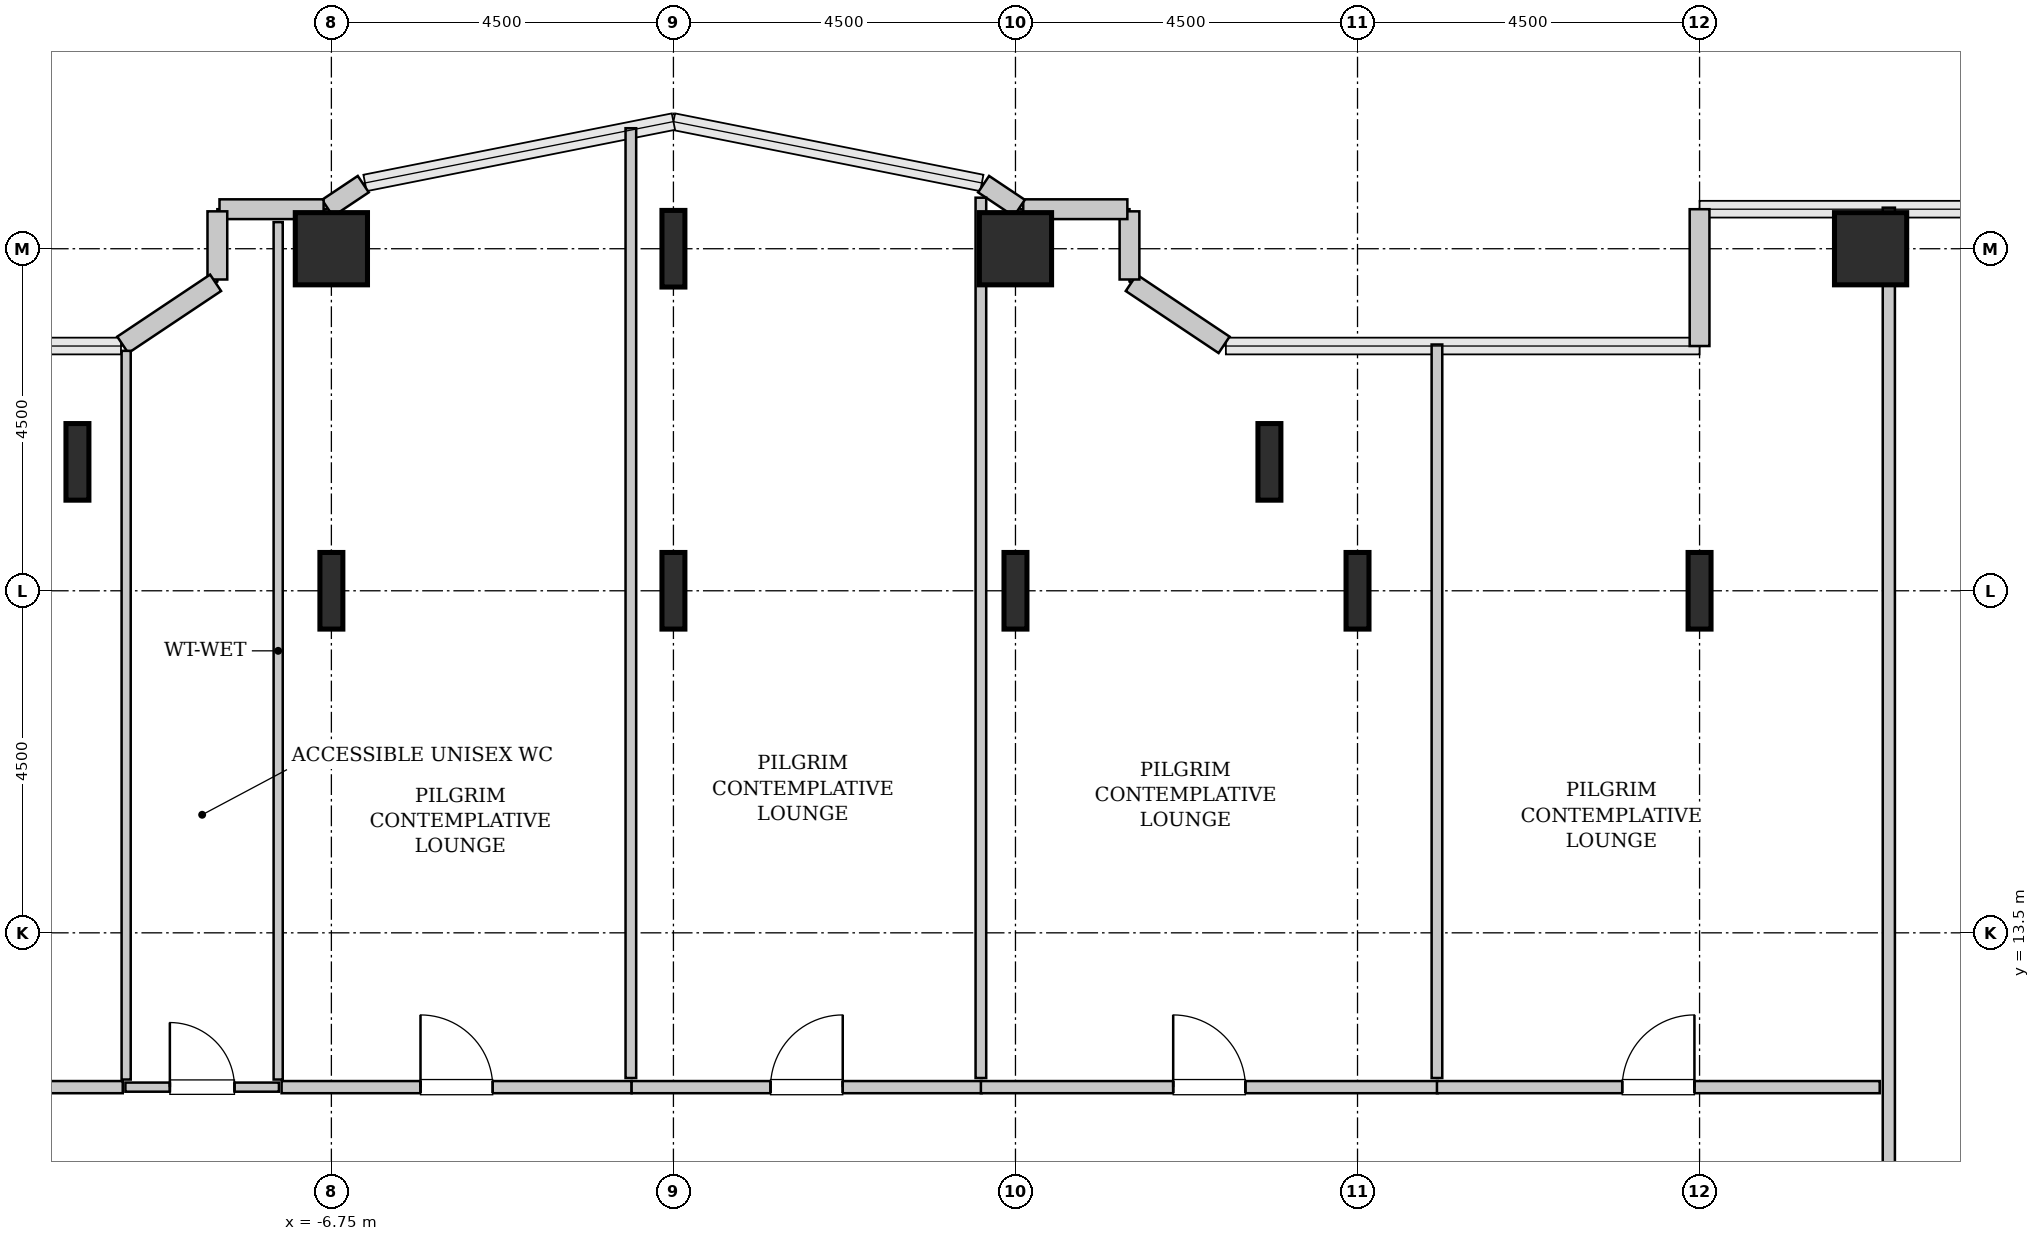
"""IFC4 building model, lengths in metres.
Left out: names, types, materials, properties, quantities, classifications, styles, units other than length and angle.
Written with IfcOpenShell. Run it as: python <this file> out.ifc"""

import sys

from ifc_helpers import new_model, si_unit, direction, frame, frame_2d, origin, origin_2d, place, context, subcontext, project, spatial, rectangle, hollow_rectangle, i_section, extrude, source, transform, mapped, element, fill, save


model = new_model("IFC4")
c1 = context("Model", 3, precision=1e-05, world=origin(), true_north=direction((0.0, 1.0)))
c2 = subcontext(c1, "Body", "Model", "MODEL_VIEW")
j1 = project(units=[si_unit("LENGTHUNIT", "METRE"), si_unit("PLANEANGLEUNIT", "RADIAN")], contexts=[c1])
p1 = place(None, origin())
s1 = spatial("IfcSite", under=j1, at=p1, CompositionType="ELEMENT")
p2 = place(p1, origin())
s2 = spatial("IfcBuilding", under=s1, at=p2, CompositionType="ELEMENT")
p3 = place(p2, frame((0.0, 0.0, 63.4)))
s3 = spatial("IfcBuildingStorey", under=s2, at=p3, CompositionType="ELEMENT", Elevation=63.4)
m1 = source(origin(), c2, "Body", "SweptSolid", [
    extrude(i_section(OverallWidth=0.302, OverallDepth=1.008, WebThickness=0.021, FlangeThickness=0.04, FilletRadius=0.03, at=origin_2d()), origin(), (0.0, 0.0, 1.0), 3.8),
])
for number, where, z_axis, x_axis in (
    (1, (-10.091, 19.696, 0.0), (0.0, 0.0, 1.0), (1.0, 0.0, 0.0)),
    (2, (-6.75, 18.0, 0.0), (0.0, 0.0, 1.0), (1.0, 0.0, 0.0)),
):
    element("IfcColumn", number, at=place(p3, frame(where, z_axis=z_axis, x_axis=x_axis)), inside=s3, PredefinedType="COLUMN", context=c2, shape_type="MappedRepresentation", body=[
        mapped(m1, transform((0.0, 0.0, 0.0), x_axis=(1.0, 0.0, 0.0), y_axis=(0.0, 1.0, 0.0), z_axis=(0.0, 0.0, 1.0), scale=1.0)),
    ])
m2 = source(origin(), c2, "Body", "SweptSolid", [
    extrude(hollow_rectangle(XDim=0.95, YDim=0.95, WallThickness=0.045, InnerFilletRadius=0.045, OuterFilletRadius=0.09, at=origin_2d()), origin(), (0.0, 0.0, 1.0), 3.8),
])
p4 = place(p3, frame((-6.75, 22.5, 0.0), z_axis=(0.0, 0.0, 1.0), x_axis=(1.0, 0.0, 0.0)))
e3 = element("IfcColumn", 3, at=p4, inside=s3, PredefinedType="COLUMN", context=c2, shape_type="MappedRepresentation", body=[
    mapped(m2, transform((0.0, 0.0, 0.0), x_axis=(1.0, 0.0, 0.0), y_axis=(0.0, 1.0, 0.0), z_axis=(0.0, 0.0, 1.0), scale=1.0)),
])
for number, where, z_axis, x_axis in (
    (4, (-2.25, 18.0, 0.0), (0.0, 0.0, 1.0), (1.0, 0.0, 0.0)),
    (5, (-2.25, 22.5, 0.0), (0.0, 0.0, 1.0), (1.0, 0.0, 0.0)),
    (6, (2.25, 18.0, 0.0), (0.0, 0.0, 1.0), (1.0, 0.0, 0.0)),
):
    element("IfcColumn", number, at=place(p3, frame(where, z_axis=z_axis, x_axis=x_axis)), inside=s3, PredefinedType="COLUMN", context=c2, shape_type="MappedRepresentation", body=[
        mapped(m1, transform((0.0, 0.0, 0.0), x_axis=(1.0, 0.0, 0.0), y_axis=(0.0, 1.0, 0.0), z_axis=(0.0, 0.0, 1.0), scale=1.0)),
    ])
p5 = place(p3, frame((2.25, 22.5, 0.0), z_axis=(0.0, 0.0, 1.0), x_axis=(1.0, 0.0, 0.0)))
e7 = element("IfcColumn", 7, at=p5, inside=s3, PredefinedType="COLUMN", context=c2, shape_type="MappedRepresentation", body=[
    mapped(m2, transform((0.0, 0.0, 0.0), x_axis=(1.0, 0.0, 0.0), y_axis=(0.0, 1.0, 0.0), z_axis=(0.0, 0.0, 1.0), scale=1.0)),
])
for number, where, z_axis, x_axis in (
    (8, (5.591, 19.696, 0.0), (0.0, 0.0, 1.0), (1.0, 0.0, 0.0)),
    (9, (6.75, 18.0, 0.0), (0.0, 0.0, 1.0), (1.0, 0.0, 0.0)),
    (10, (11.25, 18.0, 0.0), (0.0, 0.0, 1.0), (1.0, 0.0, 0.0)),
):
    element("IfcColumn", number, at=place(p3, frame(where, z_axis=z_axis, x_axis=x_axis)), inside=s3, PredefinedType="COLUMN", context=c2, shape_type="MappedRepresentation", body=[
        mapped(m1, transform((0.0, 0.0, 0.0), x_axis=(1.0, 0.0, 0.0), y_axis=(0.0, 1.0, 0.0), z_axis=(0.0, 0.0, 1.0), scale=1.0)),
    ])
p6 = place(p3, frame((13.5, 22.5, 0.0), z_axis=(0.0, 0.0, 1.0), x_axis=(1.0, 0.0, 0.0)))
e11 = element("IfcColumn", 11, at=p6, inside=s3, PredefinedType="COLUMN", context=c2, shape_type="MappedRepresentation", body=[
    mapped(m2, transform((0.0, 0.0, 0.0), x_axis=(1.0, 0.0, 0.0), y_axis=(0.0, 1.0, 0.0), z_axis=(0.0, 0.0, 1.0), scale=1.0)),
])
m3 = source(origin(), c2, "Body", "SweptSolid", [
    extrude(rectangle(XDim=1.8, YDim=0.26, at=frame_2d((0.9, 0.0))), origin(), (0.0, 0.0, 1.0), 3.55),
])
p7 = place(p3, frame((11.25, 23.02, 0.0), z_axis=(0.0, 0.0, 1.0), x_axis=(0.0, -1.0, 0.0)))
e12 = element("IfcWall", 12, at=p7, inside=s3, PredefinedType="SOLIDWALL", context=c2, shape_type="MappedRepresentation", body=[
    mapped(m3, transform((0.0, 0.0, 0.0), x_axis=(1.0, 0.0, 0.0), y_axis=(0.0, 1.0, 0.0), z_axis=(0.0, 0.0, 1.0), scale=1.0)),
])
m4 = source(origin(), c2, "Body", "SweptSolid", [
    extrude(rectangle(XDim=1.469, YDim=0.26, at=frame_2d((0.734, 0.0))), origin(), (0.0, 0.0, 1.0), 3.55),
])
p8 = place(p3, frame((4.995, 21.236, 0.0), z_axis=(0.0, 0.0, 1.0), x_axis=(-0.831461760506, 0.555581983884, 0.0)))
e13 = element("IfcWall", 13, at=p8, inside=s3, PredefinedType="SOLIDWALL", context=c2, shape_type="MappedRepresentation", body=[
    mapped(m4, transform((0.0, 0.0, 0.0), x_axis=(1.0, 0.0, 0.0), y_axis=(0.0, 1.0, 0.0), z_axis=(0.0, 0.0, 1.0), scale=1.0)),
])
m5 = source(origin(), c2, "Body", "SweptSolid", [
    extrude(rectangle(XDim=0.897, YDim=0.26, at=frame_2d((0.448, 0.0))), origin(), (0.0, 0.0, 1.0), 3.55),
])
p9 = place(p3, frame((3.75, 22.095, 0.0), z_axis=(0.0, 0.0, 1.0), x_axis=(0.0, 1.0, 0.0)))
e14 = element("IfcWall", 14, at=p9, inside=s3, PredefinedType="SOLIDWALL", context=c2, shape_type="MappedRepresentation", body=[
    mapped(m5, transform((0.0, 0.0, 0.0), x_axis=(1.0, 0.0, 0.0), y_axis=(0.0, 1.0, 0.0), z_axis=(0.0, 0.0, 1.0), scale=1.0)),
])
m6 = source(origin(), c2, "Body", "SweptSolid", [
    extrude(rectangle(XDim=1.37, YDim=0.26, at=frame_2d((0.685, 0.0))), origin(), (0.0, 0.0, 1.0), 3.55),
])
p10 = place(p3, frame((3.722, 23.02, 0.0), z_axis=(0.0, 0.0, 1.0), x_axis=(-1.0, 0.0, 0.0)))
e15 = element("IfcWall", 15, at=p10, inside=s3, PredefinedType="SOLIDWALL", context=c2, shape_type="MappedRepresentation", body=[
    mapped(m6, transform((0.0, 0.0, 0.0), x_axis=(1.0, 0.0, 0.0), y_axis=(0.0, 1.0, 0.0), z_axis=(0.0, 0.0, 1.0), scale=1.0)),
])
m7 = source(origin(), c2, "Body", "SweptSolid", [
    extrude(rectangle(XDim=0.565, YDim=0.26, at=frame_2d((0.283, 0.0))), origin(), (0.0, 0.0, 1.0), 3.55),
])
for number, where, z_axis, x_axis in (
    (16, (2.301, 23.036, 0.0), (0.0, 0.0, 1.0), (-0.832, 0.555, 0.0)),
    (17, (-6.331, 23.35, 0.0), (0.0, 0.0, 1.0), (-0.832, -0.555, 0.0)),
):
    element("IfcWall", number, at=place(p3, frame(where, z_axis=z_axis, x_axis=x_axis)), inside=s3, PredefinedType="SOLIDWALL", context=c2, shape_type="MappedRepresentation", body=[
        mapped(m7, transform((0.0, 0.0, 0.0), x_axis=(1.0, 0.0, 0.0), y_axis=(0.0, 1.0, 0.0), z_axis=(0.0, 0.0, 1.0), scale=1.0)),
    ])
p11 = place(p3, frame((-6.852, 23.02, 0.0), z_axis=(0.0, 0.0, 1.0), x_axis=(-1.0, 0.0, 0.0)))
e18 = element("IfcWall", 18, at=p11, inside=s3, PredefinedType="SOLIDWALL", context=c2, shape_type="MappedRepresentation", body=[
    mapped(m6, transform((0.0, 0.0, 0.0), x_axis=(1.0, 0.0, 0.0), y_axis=(0.0, 1.0, 0.0), z_axis=(0.0, 0.0, 1.0), scale=1.0)),
])
p12 = place(p3, frame((-8.25, 22.992, 0.0), z_axis=(0.0, 0.0, 1.0), x_axis=(0.0, -1.0, 0.0)))
e19 = element("IfcWall", 19, at=p12, inside=s3, PredefinedType="SOLIDWALL", context=c2, shape_type="MappedRepresentation", body=[
    mapped(m5, transform((0.0, 0.0, 0.0), x_axis=(1.0, 0.0, 0.0), y_axis=(0.0, 1.0, 0.0), z_axis=(0.0, 0.0, 1.0), scale=1.0)),
])
p13 = place(p3, frame((-8.273, 22.052, 0.0), z_axis=(0.0, 0.0, 1.0), x_axis=(-0.831461760506, -0.555581983884, 0.0)))
e20 = element("IfcWall", 20, at=p13, inside=s3, PredefinedType="SOLIDWALL", context=c2, shape_type="MappedRepresentation", body=[
    mapped(m4, transform((0.0, 0.0, 0.0), x_axis=(1.0, 0.0, 0.0), y_axis=(0.0, 1.0, 0.0), z_axis=(0.0, 0.0, 1.0), scale=1.0)),
])
m8 = source(origin(), c2, "Body", "SweptSolid", [
    extrude(rectangle(XDim=2.02, YDim=0.12, at=frame_2d((1.01, 0.0))), origin(), (0.0, 0.0, 1.0), 3.535),
])
p14 = place(p3, frame((-9.46, 11.47, 0.0), z_axis=(0.0, 0.0, 1.0), x_axis=(1.0, 0.0, 0.0)))
e21 = element("IfcWall", 21, at=p14, inside=s3, PredefinedType="PLUMBINGWALL", context=c2, shape_type="MappedRepresentation", body=[
    mapped(m8, transform((0.0, 0.0, 0.0), x_axis=(1.0, 0.0, 0.0), y_axis=(0.0, 1.0, 0.0), z_axis=(0.0, 0.0, 1.0), scale=1.0)),
])
p15 = place(p14, frame((0.585, 0.0, 0.0)))
e22 = element("IfcOpeningElement", 22, at=p15, cuts=e21, PredefinedType="OPENING", context=c2, shape_type="SweptSolid", body=[
    extrude(rectangle(XDim=0.85, YDim=2.1, at=frame_2d((0.425, 1.05))), frame((0.0, 0.07, 0.0), z_axis=(0.0, -1.0, 0.0), x_axis=(1.0, 0.0, 0.0)), (0.0, 0.0, 1.0), 0.14),
])
m9 = source(origin(), c2, "Body", "SweptSolid", [
    extrude(rectangle(XDim=11.28, YDim=0.12, at=frame_2d((5.64, 0.0))), origin(), (0.0, 0.0, 1.0), 3.535),
])
p16 = place(p3, frame((-7.45, 11.57, 0.0), z_axis=(0.0, 0.0, 1.0), x_axis=(0.0, 1.0, 0.0)))
e23 = element("IfcWall", 23, at=p16, inside=s3, PredefinedType="PLUMBINGWALL", context=c2, shape_type="MappedRepresentation", body=[
    mapped(m9, transform((0.0, 0.0, 0.0), x_axis=(1.0, 0.0, 0.0), y_axis=(0.0, 1.0, 0.0), z_axis=(0.0, 0.0, 1.0), scale=1.0)),
])
m10 = source(origin(), c2, "Body", "SweptSolid", [
    extrude(rectangle(XDim=9.587, YDim=0.12, at=frame_2d((4.793, 0.0))), origin(), (0.0, 0.0, 1.0), 3.535),
])
p17 = place(p3, frame((-9.45, 11.57, 0.0), z_axis=(0.0, 0.0, 1.0), x_axis=(0.0, 1.0, 0.0)))
e24 = element("IfcWall", 24, at=p17, inside=s3, PredefinedType="PLUMBINGWALL", context=c2, shape_type="MappedRepresentation", body=[
    mapped(m10, transform((0.0, 0.0, 0.0), x_axis=(1.0, 0.0, 0.0), y_axis=(0.0, 1.0, 0.0), z_axis=(0.0, 0.0, 1.0), scale=1.0)),
])
m11 = source(origin(), c2, "Body", "SweptSolid", [
    extrude(rectangle(XDim=14.545, YDim=0.16, at=frame_2d((7.272, 0.0))), origin(), (0.0, 0.0, 1.0), 3.535),
])
p18 = place(p3, frame((13.74, 8.495, 0.0), z_axis=(0.0, 0.0, 1.0), x_axis=(0.0, 1.0, 0.0)))
e25 = element("IfcWall", 25, at=p18, inside=s3, PredefinedType="PARTITIONING", context=c2, shape_type="MappedRepresentation", body=[
    mapped(m11, transform((0.0, 0.0, 0.0), x_axis=(1.0, 0.0, 0.0), y_axis=(0.0, 1.0, 0.0), z_axis=(0.0, 0.0, 1.0), scale=1.0)),
])
p19 = place(p18, frame((1.032, 0.0, 0.0)))
e26 = element("IfcOpeningElement", 26, at=p19, cuts=e25, PredefinedType="OPENING", context=c2, shape_type="SweptSolid", body=[
    extrude(rectangle(XDim=0.95, YDim=2.1, at=frame_2d((0.475, 1.05))), frame((0.0, 0.09, 0.0), z_axis=(0.0, -1.0, 0.0), x_axis=(1.0, 0.0, 0.0)), (0.0, 0.0, 1.0), 0.18),
])
m12 = source(origin(), c2, "Body", "SweptSolid", [
    extrude(rectangle(XDim=4.125, YDim=0.16, at=frame_2d((2.062, 0.0))), origin(), (0.0, 0.0, 1.0), 3.535),
])
p20 = place(p3, frame((-13.62, 11.47, 0.0), z_axis=(0.0, 0.0, 1.0), x_axis=(1.0, 0.0, 0.0)))
e27 = element("IfcWall", 27, at=p20, inside=s3, PredefinedType="PARTITIONING", context=c2, shape_type="MappedRepresentation", body=[
    mapped(m12, transform((0.0, 0.0, 0.0), x_axis=(1.0, 0.0, 0.0), y_axis=(0.0, 1.0, 0.0), z_axis=(0.0, 0.0, 1.0), scale=1.0)),
])
p21 = place(p20, frame((1.587, 0.0, 0.0)))
e28 = element("IfcOpeningElement", 28, at=p21, cuts=e27, PredefinedType="OPENING", context=c2, shape_type="SweptSolid", body=[
    extrude(rectangle(XDim=0.95, YDim=2.1, at=frame_2d((0.475, 1.05))), frame((0.0, 0.09, 0.0), z_axis=(0.0, -1.0, 0.0), x_axis=(1.0, 0.0, 0.0)), (0.0, 0.0, 1.0), 0.18),
])
m13 = source(origin(), c2, "Body", "SweptSolid", [
    extrude(rectangle(XDim=4.605, YDim=0.16, at=frame_2d((2.302, 0.0))), origin(), (0.0, 0.0, 1.0), 3.535),
])
p22 = place(p3, frame((-7.405, 11.47, 0.0), z_axis=(0.0, 0.0, 1.0), x_axis=(1.0, 0.0, 0.0)))
e29 = element("IfcWall", 29, at=p22, inside=s3, PredefinedType="PARTITIONING", context=c2, shape_type="MappedRepresentation", body=[
    mapped(m13, transform((0.0, 0.0, 0.0), x_axis=(1.0, 0.0, 0.0), y_axis=(0.0, 1.0, 0.0), z_axis=(0.0, 0.0, 1.0), scale=1.0)),
])
p23 = place(p22, frame((1.827, 0.0, 0.0)))
e30 = element("IfcOpeningElement", 30, at=p23, cuts=e29, PredefinedType="OPENING", context=c2, shape_type="SweptSolid", body=[
    extrude(rectangle(XDim=0.95, YDim=2.1, at=frame_2d((0.475, 1.05))), frame((0.0, 0.09, 0.0), z_axis=(0.0, -1.0, 0.0), x_axis=(1.0, 0.0, 0.0)), (0.0, 0.0, 1.0), 0.18),
])
m14 = source(origin(), c2, "Body", "SweptSolid", [
    extrude(rectangle(XDim=12.495, YDim=0.14, at=frame_2d((6.248, 0.0))), origin(), (0.0, 0.0, 1.0), 3.535),
])
p24 = place(p3, frame((-2.81, 11.59, 0.0), z_axis=(0.0, 0.0, 1.0), x_axis=(0.0, 1.0, 0.0)))
e31 = element("IfcWall", 31, at=p24, inside=s3, PredefinedType="PARTITIONING", context=c2, shape_type="MappedRepresentation", body=[
    mapped(m14, transform((0.0, 0.0, 0.0), x_axis=(1.0, 0.0, 0.0), y_axis=(0.0, 1.0, 0.0), z_axis=(0.0, 0.0, 1.0), scale=1.0)),
])
p25 = place(p3, frame((-2.8, 11.47, 0.0), z_axis=(0.0, 0.0, 1.0), x_axis=(1.0, 0.0, 0.0)))
e32 = element("IfcWall", 32, at=p25, inside=s3, PredefinedType="PARTITIONING", context=c2, shape_type="MappedRepresentation", body=[
    mapped(m13, transform((0.0, 0.0, 0.0), x_axis=(1.0, 0.0, 0.0), y_axis=(0.0, 1.0, 0.0), z_axis=(0.0, 0.0, 1.0), scale=1.0)),
])
p26 = place(p25, frame((1.827, 0.0, 0.0)))
e33 = element("IfcOpeningElement", 33, at=p26, cuts=e32, PredefinedType="OPENING", context=c2, shape_type="SweptSolid", body=[
    extrude(rectangle(XDim=0.95, YDim=2.1, at=frame_2d((0.475, 1.05))), frame((0.0, 0.09, 0.0), z_axis=(0.0, -1.0, 0.0), x_axis=(1.0, 0.0, 0.0)), (0.0, 0.0, 1.0), 0.18),
])
m15 = source(origin(), c2, "Body", "SweptSolid", [
    extrude(rectangle(XDim=11.581, YDim=0.14, at=frame_2d((5.791, 0.0))), origin(), (0.0, 0.0, 1.0), 2.825),
])
p27 = place(p3, frame((1.795, 11.59, 0.0), z_axis=(0.0, 0.0, 1.0), x_axis=(0.0, 1.0, 0.0)))
e34 = element("IfcWall", 34, at=p27, inside=s3, PredefinedType="PARTITIONING", context=c2, shape_type="MappedRepresentation", body=[
    mapped(m15, transform((0.0, 0.0, 0.0), x_axis=(1.0, 0.0, 0.0), y_axis=(0.0, 1.0, 0.0), z_axis=(0.0, 0.0, 1.0), scale=1.0)),
])
m16 = source(origin(), c2, "Body", "SweptSolid", [
    extrude(rectangle(XDim=6.01, YDim=0.16, at=frame_2d((3.005, 0.0))), origin(), (0.0, 0.0, 1.0), 3.535),
])
p28 = place(p3, frame((1.795, 11.47, 0.0), z_axis=(0.0, 0.0, 1.0), x_axis=(1.0, 0.0, 0.0)))
e35 = element("IfcWall", 35, at=p28, inside=s3, PredefinedType="PARTITIONING", context=c2, shape_type="MappedRepresentation", body=[
    mapped(m16, transform((0.0, 0.0, 0.0), x_axis=(1.0, 0.0, 0.0), y_axis=(0.0, 1.0, 0.0), z_axis=(0.0, 0.0, 1.0), scale=1.0)),
])
p29 = place(p28, frame((2.53, 0.0, 0.0)))
e36 = element("IfcOpeningElement", 36, at=p29, cuts=e35, PredefinedType="OPENING", context=c2, shape_type="SweptSolid", body=[
    extrude(rectangle(XDim=0.95, YDim=2.1, at=frame_2d((0.475, 1.05))), frame((0.0, 0.09, 0.0), z_axis=(0.0, -1.0, 0.0), x_axis=(1.0, 0.0, 0.0)), (0.0, 0.0, 1.0), 0.18),
])
m17 = source(origin(), c2, "Body", "SweptSolid", [
    extrude(rectangle(XDim=9.65, YDim=0.14, at=frame_2d((4.825, 0.0))), origin(), (0.0, 0.0, 1.0), 3.535),
])
p30 = place(p3, frame((7.795, 11.59, 0.0), z_axis=(0.0, 0.0, 1.0), x_axis=(0.0, 1.0, 0.0)))
e37 = element("IfcWall", 37, at=p30, inside=s3, PredefinedType="PARTITIONING", context=c2, shape_type="MappedRepresentation", body=[
    mapped(m17, transform((0.0, 0.0, 0.0), x_axis=(1.0, 0.0, 0.0), y_axis=(0.0, 1.0, 0.0), z_axis=(0.0, 0.0, 1.0), scale=1.0)),
])
m18 = source(origin(), c2, "Body", "SweptSolid", [
    extrude(rectangle(XDim=5.825, YDim=0.16, at=frame_2d((2.913, 0.0))), origin(), (0.0, 0.0, 1.0), 3.535),
])
p31 = place(p3, frame((7.795, 11.47, 0.0), z_axis=(0.0, 0.0, 1.0), x_axis=(1.0, 0.0, 0.0)))
e38 = element("IfcWall", 38, at=p31, inside=s3, PredefinedType="PARTITIONING", context=c2, shape_type="MappedRepresentation", body=[
    mapped(m18, transform((0.0, 0.0, 0.0), x_axis=(1.0, 0.0, 0.0), y_axis=(0.0, 1.0, 0.0), z_axis=(0.0, 0.0, 1.0), scale=1.0)),
])
p32 = place(p31, frame((2.438, 0.0, 0.0)))
e39 = element("IfcOpeningElement", 39, at=p32, cuts=e38, PredefinedType="OPENING", context=c2, shape_type="SweptSolid", body=[
    extrude(rectangle(XDim=0.95, YDim=2.1, at=frame_2d((0.475, 1.05))), frame((0.0, 0.09, 0.0), z_axis=(0.0, -1.0, 0.0), x_axis=(1.0, 0.0, 0.0)), (0.0, 0.0, 1.0), 0.18),
])
m19 = source(origin(), c2, "Body", "SweptSolid", [
    extrude(rectangle(XDim=0.85, YDim=2.1, at=frame_2d((0.425, 1.05))), frame((0.0, 0.025, 0.0), z_axis=(0.0, -1.0, 0.0), x_axis=(1.0, 0.0, 0.0)), (0.0, 0.0, 1.0), 0.05),
])
p33 = place(p15, origin())
e40 = element("IfcDoor", 40, at=p33, inside=s3, OperationType="SINGLE_SWING_LEFT", PredefinedType="DOOR", context=c2, shape_type="MappedRepresentation", body=[
    mapped(m19, transform((0.0, 0.0, 0.0), x_axis=(1.0, 0.0, 0.0), y_axis=(0.0, 1.0, 0.0), z_axis=(0.0, 0.0, 1.0), scale=1.0)),
])
fill(e22, e40)
m20 = source(origin(), c2, "Body", "SweptSolid", [
    extrude(rectangle(XDim=0.95, YDim=2.1, at=frame_2d((0.475, 1.05))), frame((0.0, 0.025, 0.0), z_axis=(0.0, -1.0, 0.0), x_axis=(1.0, 0.0, 0.0)), (0.0, 0.0, 1.0), 0.05),
])
p34 = place(p23, origin())
e41 = element("IfcDoor", 41, at=p34, inside=s3, OperationType="SINGLE_SWING_LEFT", PredefinedType="DOOR", context=c2, shape_type="MappedRepresentation", body=[
    mapped(m20, transform((0.0, 0.0, 0.0), x_axis=(1.0, 0.0, 0.0), y_axis=(0.0, 1.0, 0.0), z_axis=(0.0, 0.0, 1.0), scale=1.0)),
])
fill(e30, e41)
p35 = place(p26, origin())
e42 = element("IfcDoor", 42, at=p35, inside=s3, OperationType="SINGLE_SWING_RIGHT", PredefinedType="DOOR", context=c2, shape_type="MappedRepresentation", body=[
    mapped(m20, transform((0.0, 0.0, 0.0), x_axis=(1.0, 0.0, 0.0), y_axis=(0.0, 1.0, 0.0), z_axis=(0.0, 0.0, 1.0), scale=1.0)),
])
fill(e33, e42)
p36 = place(p29, origin())
e43 = element("IfcDoor", 43, at=p36, inside=s3, OperationType="SINGLE_SWING_LEFT", PredefinedType="DOOR", context=c2, shape_type="MappedRepresentation", body=[
    mapped(m20, transform((0.0, 0.0, 0.0), x_axis=(1.0, 0.0, 0.0), y_axis=(0.0, 1.0, 0.0), z_axis=(0.0, 0.0, 1.0), scale=1.0)),
])
fill(e36, e43)
p37 = place(p32, origin())
e44 = element("IfcDoor", 44, at=p37, inside=s3, OperationType="SINGLE_SWING_RIGHT", PredefinedType="DOOR", context=c2, shape_type="MappedRepresentation", body=[
    mapped(m20, transform((0.0, 0.0, 0.0), x_axis=(1.0, 0.0, 0.0), y_axis=(0.0, 1.0, 0.0), z_axis=(0.0, 0.0, 1.0), scale=1.0)),
])
fill(e39, e44)
save(model, sys.argv[1])
